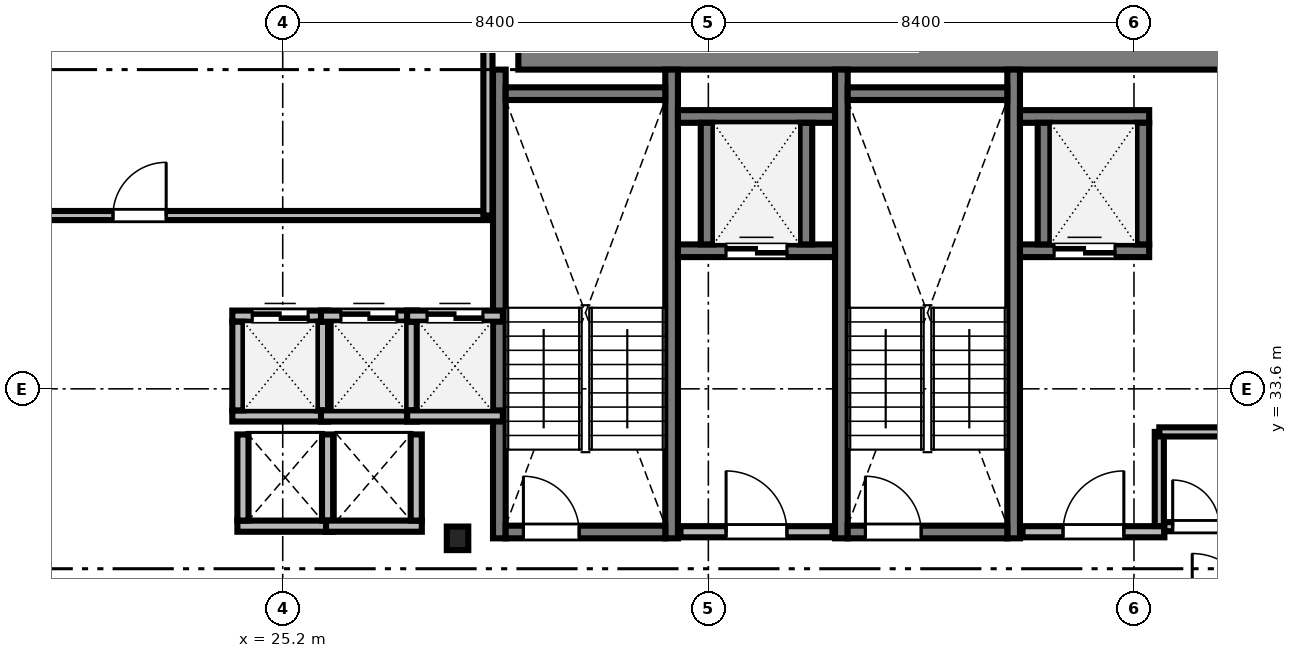
"""IFC4 building model, lengths in metres.
Left out: names, types, materials, properties, quantities, classifications, styles, units other than length and angle.
Written with IfcOpenShell. Run it as: python <this file> out.ifc"""

import sys

from ifc_helpers import new_model, si_unit, direction, frame, frame_2d, origin, origin_2d, place, context, subcontext, project, spatial, rectangle, i_section, extrude, source, transform, mapped, element, fill, save


model = new_model("IFC4")
c1 = context("Model", 3, precision=1e-05, world=origin(), true_north=direction((0.0, 1.0)))
c2 = subcontext(c1, "Body", "Model", "MODEL_VIEW")
j1 = project(units=[si_unit("LENGTHUNIT", "METRE"), si_unit("PLANEANGLEUNIT", "RADIAN")], contexts=[c1])
p1 = place(None, origin())
s1 = spatial("IfcSite", under=j1, at=p1, CompositionType="ELEMENT")
p2 = place(p1, origin())
s2 = spatial("IfcBuilding", under=s1, at=p2, CompositionType="ELEMENT")
p3 = place(p2, frame((0.0, 0.0, 115.0)))
s3 = spatial("IfcBuildingStorey", under=s2, at=p3, CompositionType="ELEMENT", Elevation=115.0)
m1 = source(origin(), c2, "Body", "SweptSolid", [
    extrude(rectangle(XDim=17.52, YDim=0.8, at=frame_2d((8.76, 0.0))), origin(), (0.0, 0.0, 1.0), 3.46),
])
p4 = place(p3, frame((29.85, 40.3, 0.0), z_axis=(0.0, 0.0, 1.0), x_axis=(1.0, 0.0, 0.0)))
e1 = element("IfcWall", 1, at=p4, inside=s3, PredefinedType="SHEAR", context=c2, shape_type="MappedRepresentation", body=[
    mapped(m1, transform((0.0, 0.0, 0.0), scale=1.0)),
])
m2 = source(origin(), c2, "Body", "SweptSolid", [
    extrude(i_section(OverallWidth=0.424, OverallDepth=0.465, WebThickness=0.035, FlangeThickness=0.056, FilletRadius=0.015, at=origin_2d()), origin(), (0.0, 0.0, 1.0), 3.46),
])
p5 = place(p3, frame((28.65, 30.65, 0.0), z_axis=(0.0, 0.0, 1.0), x_axis=(1.0, 0.0, 0.0)))
e2 = element("IfcColumn", 2, at=p5, inside=s3, PredefinedType="COLUMN", context=c2, shape_type="MappedRepresentation", body=[
    mapped(m2, transform((0.0, 0.0, 0.0), scale=1.0)),
])
m3 = source(origin(), c2, "Body", "SweptSolid", [
    extrude(rectangle(XDim=9.25, YDim=0.25, at=frame_2d((4.625, 0.0))), origin(), (0.0, 0.0, 1.0), 3.5),
])
for number, where, z_axis, x_axis in (
    (3, (29.475, 30.65, 0.0), (0.0, 0.0, 1.0), (0.0, 1.0, 0.0)),
    (4, (32.875, 30.65, 0.0), (0.0, 0.0, 1.0), (0.0, 1.0, 0.0)),
):
    element("IfcWall", number, at=place(p3, frame(where, z_axis=z_axis, x_axis=x_axis)), inside=s3, PredefinedType="SOLIDWALL", context=c2, shape_type="MappedRepresentation", body=[
        mapped(m3, transform((0.0, 0.0, 0.0), scale=1.0)),
    ])
m4 = source(origin(), c2, "Body", "SweptSolid", [
    extrude(rectangle(XDim=3.15, YDim=0.25, at=frame_2d((1.575, 0.0))), origin(), (0.0, 0.0, 1.0), 3.5),
])
p6 = place(p3, frame((29.6, 39.425, 0.0), z_axis=(0.0, 0.0, 1.0), x_axis=(1.0, 0.0, 0.0)))
e5 = element("IfcWall", 5, at=p6, inside=s3, PredefinedType="SOLIDWALL", context=c2, shape_type="MappedRepresentation", body=[
    mapped(m4, transform((0.0, 0.0, 0.0), scale=1.0)),
])
p7 = place(p3, frame((29.6, 30.775, 0.0), z_axis=(0.0, 0.0, 1.0), x_axis=(1.0, 0.0, 0.0)))
e6 = element("IfcWall", 6, at=p7, inside=s3, PredefinedType="SOLIDWALL", context=c2, shape_type="MappedRepresentation", body=[
    mapped(m4, transform((0.0, 0.0, 0.0), scale=1.0)),
])
m5 = source(origin(), c2, "Body", "SweptSolid", [
    extrude(rectangle(XDim=1.1, YDim=2.2, at=frame_2d((0.55, 1.1))), frame((0.0, 0.135, 0.0), z_axis=(0.0, -1.0, 0.0), x_axis=(1.0, 0.0, 0.0)), (0.0, 0.0, 1.0), 0.27),
])
p8 = place(p7, frame((0.35, 0.0, 0.0)))
e7 = element("IfcOpeningElement", 7, at=p8, cuts=e6, PredefinedType="OPENING", context=c2, shape_type="MappedRepresentation", body=[
    mapped(m5, transform((0.0, 0.0, 0.0), scale=1.0)),
])
for number, where, z_axis, x_axis in (
    (8, (36.225, 30.65, 0.0), (0.0, 0.0, 1.0), (0.0, 1.0, 0.0)),
    (9, (39.625, 30.65, 0.0), (0.0, 0.0, 1.0), (0.0, 1.0, 0.0)),
):
    element("IfcWall", number, at=place(p3, frame(where, z_axis=z_axis, x_axis=x_axis)), inside=s3, PredefinedType="SOLIDWALL", context=c2, shape_type="MappedRepresentation", body=[
        mapped(m3, transform((0.0, 0.0, 0.0), scale=1.0)),
    ])
p9 = place(p3, frame((36.35, 39.425, 0.0), z_axis=(0.0, 0.0, 1.0), x_axis=(1.0, 0.0, 0.0)))
e10 = element("IfcWall", 10, at=p9, inside=s3, PredefinedType="SOLIDWALL", context=c2, shape_type="MappedRepresentation", body=[
    mapped(m4, transform((0.0, 0.0, 0.0), scale=1.0)),
])
p10 = place(p3, frame((36.35, 30.775, 0.0), z_axis=(0.0, 0.0, 1.0), x_axis=(1.0, 0.0, 0.0)))
e11 = element("IfcWall", 11, at=p10, inside=s3, PredefinedType="SOLIDWALL", context=c2, shape_type="MappedRepresentation", body=[
    mapped(m4, transform((0.0, 0.0, 0.0), scale=1.0)),
])
p11 = place(p10, frame((0.35, 0.0, 0.0)))
e12 = element("IfcOpeningElement", 12, at=p11, cuts=e11, PredefinedType="OPENING", context=c2, shape_type="MappedRepresentation", body=[
    mapped(m5, transform((0.0, 0.0, 0.0), scale=1.0)),
])
m6 = source(origin(), c2, "Body", "SweptSolid", [
    extrude(rectangle(XDim=3.0, YDim=0.22, at=frame_2d((1.5, 0.0))), origin(), (0.0, 0.0, 1.0), 3.46),
])
p12 = place(p3, frame((33.05, 30.78, 0.0), z_axis=(0.0, 0.0, 1.0), x_axis=(1.0, 0.0, 0.0)))
e13 = element("IfcWall", 13, at=p12, inside=s3, PredefinedType="SOLIDWALL", context=c2, shape_type="MappedRepresentation", body=[
    mapped(m6, transform((0.0, 0.0, 0.0), scale=1.0)),
])
m7 = source(origin(), c2, "Body", "SweptSolid", [
    extrude(rectangle(XDim=1.2, YDim=2.2, at=frame_2d((0.6, 1.1))), frame((0.0, 0.12, 0.0), z_axis=(0.0, -1.0, 0.0), x_axis=(1.0, 0.0, 0.0)), (0.0, 0.0, 1.0), 0.24),
])
p13 = place(p12, frame((0.9, 0.0, 0.0)))
e14 = element("IfcOpeningElement", 14, at=p13, cuts=e13, PredefinedType="OPENING", context=c2, shape_type="MappedRepresentation", body=[
    mapped(m7, transform((0.0, 0.0, 0.0), scale=1.0)),
])
m8 = source(origin(), c2, "Body", "SweptSolid", [
    extrude(rectangle(XDim=2.8, YDim=0.22, at=frame_2d((1.4, 0.0))), origin(), (0.0, 0.0, 1.0), 3.46),
])
p14 = place(p3, frame((39.8, 30.78, 0.0), z_axis=(0.0, 0.0, 1.0), x_axis=(1.0, 0.0, 0.0)))
e15 = element("IfcWall", 15, at=p14, inside=s3, PredefinedType="SOLIDWALL", context=c2, shape_type="MappedRepresentation", body=[
    mapped(m8, transform((0.0, 0.0, 0.0), scale=1.0)),
])
p15 = place(p14, frame((0.8, 0.0, 0.0)))
e16 = element("IfcOpeningElement", 16, at=p15, cuts=e15, PredefinedType="OPENING", context=c2, shape_type="MappedRepresentation", body=[
    mapped(m7, transform((0.0, 0.0, 0.0), scale=1.0)),
])
m9 = source(origin(), c2, "Body", "SweptSolid", [
    extrude(rectangle(XDim=1.89, YDim=0.22, at=frame_2d((0.945, 0.0))), origin(), (0.0, 0.0, 1.0), 3.46),
])
p16 = place(p3, frame((24.205, 33.065, 0.0), z_axis=(0.0, 0.0, 1.0), x_axis=(1.0, 0.0, 0.0)))
e17 = element("IfcWall", 17, at=p16, inside=s3, PredefinedType="SOLIDWALL", context=c2, shape_type="MappedRepresentation", body=[
    mapped(m9, transform((0.0, 0.0, 0.0), scale=1.0)),
])
p17 = place(p3, frame((24.205, 35.035, 0.0), z_axis=(0.0, 0.0, 1.0), x_axis=(1.0, 0.0, 0.0)))
e18 = element("IfcWall", 18, at=p17, inside=s3, PredefinedType="SOLIDWALL", context=c2, shape_type="MappedRepresentation", body=[
    mapped(m9, transform((0.0, 0.0, 0.0), scale=1.0)),
])
m10 = source(origin(), c2, "Body", "SweptSolid", [
    extrude(rectangle(XDim=1.1, YDim=2.2, at=frame_2d((0.55, 1.1))), frame((0.0, 0.12, 0.0), z_axis=(0.0, -1.0, 0.0), x_axis=(1.0, 0.0, 0.0)), (0.0, 0.0, 1.0), 0.24),
])
p18 = place(p17, frame((0.395, 0.0, 0.0)))
e19 = element("IfcOpeningElement", 19, at=p18, cuts=e18, PredefinedType="OPENING", context=c2, shape_type="MappedRepresentation", body=[
    mapped(m10, transform((0.0, 0.0, 0.0), scale=1.0)),
])
m11 = source(origin(), c2, "Body", "SweptSolid", [
    extrude(rectangle(XDim=1.75, YDim=0.22, at=frame_2d((0.875, 0.0))), origin(), (0.0, 0.0, 1.0), 3.46),
])
for number, where, z_axis, x_axis in (
    (20, (24.315, 33.175, 0.0), (0.0, 0.0, 1.0), (0.0, 1.0, 0.0)),
    (21, (25.985, 33.175, 0.0), (0.0, 0.0, 1.0), (0.0, 1.0, 0.0)),
):
    element("IfcWall", number, at=place(p3, frame(where, z_axis=z_axis, x_axis=x_axis)), inside=s3, PredefinedType="SOLIDWALL", context=c2, shape_type="MappedRepresentation", body=[
        mapped(m11, transform((0.0, 0.0, 0.0), scale=1.0)),
    ])
p19 = place(p3, frame((25.955, 33.065, 0.0), z_axis=(0.0, 0.0, 1.0), x_axis=(1.0, 0.0, 0.0)))
e22 = element("IfcWall", 22, at=p19, inside=s3, PredefinedType="SOLIDWALL", context=c2, shape_type="MappedRepresentation", body=[
    mapped(m9, transform((0.0, 0.0, 0.0), scale=1.0)),
])
p20 = place(p3, frame((25.955, 35.035, 0.0), z_axis=(0.0, 0.0, 1.0), x_axis=(1.0, 0.0, 0.0)))
e23 = element("IfcWall", 23, at=p20, inside=s3, PredefinedType="SOLIDWALL", context=c2, shape_type="MappedRepresentation", body=[
    mapped(m9, transform((0.0, 0.0, 0.0), scale=1.0)),
])
p21 = place(p20, frame((0.395, 0.0, 0.0)))
e24 = element("IfcOpeningElement", 24, at=p21, cuts=e23, PredefinedType="OPENING", context=c2, shape_type="MappedRepresentation", body=[
    mapped(m10, transform((0.0, 0.0, 0.0), scale=1.0)),
])
p22 = place(p3, frame((27.735, 33.175, 0.0), z_axis=(0.0, 0.0, 1.0), x_axis=(0.0, 1.0, 0.0)))
e25 = element("IfcWall", 25, at=p22, inside=s3, PredefinedType="SOLIDWALL", context=c2, shape_type="MappedRepresentation", body=[
    mapped(m11, transform((0.0, 0.0, 0.0), scale=1.0)),
])
p23 = place(p3, frame((27.655, 33.065, 0.0), z_axis=(0.0, 0.0, 1.0), x_axis=(1.0, 0.0, 0.0)))
e26 = element("IfcWall", 26, at=p23, inside=s3, PredefinedType="SOLIDWALL", context=c2, shape_type="MappedRepresentation", body=[
    mapped(m9, transform((0.0, 0.0, 0.0), scale=1.0)),
])
p24 = place(p3, frame((27.655, 35.035, 0.0), z_axis=(0.0, 0.0, 1.0), x_axis=(1.0, 0.0, 0.0)))
e27 = element("IfcWall", 27, at=p24, inside=s3, PredefinedType="SOLIDWALL", context=c2, shape_type="MappedRepresentation", body=[
    mapped(m9, transform((0.0, 0.0, 0.0), scale=1.0)),
])
p25 = place(p24, frame((0.395, 0.0, 0.0)))
e28 = element("IfcOpeningElement", 28, at=p25, cuts=e27, PredefinedType="OPENING", context=c2, shape_type="MappedRepresentation", body=[
    mapped(m10, transform((0.0, 0.0, 0.0), scale=1.0)),
])
m12 = source(origin(), c2, "Body", "SweptSolid", [
    extrude(rectangle(XDim=3.1, YDim=0.25, at=frame_2d((1.55, 0.0))), origin(), (0.0, 0.0, 1.0), 3.46),
])
p26 = place(p3, frame((33.0, 36.325, 0.0), z_axis=(0.0, 0.0, 1.0), x_axis=(1.0, 0.0, 0.0)))
e29 = element("IfcWall", 29, at=p26, inside=s3, PredefinedType="SOLIDWALL", context=c2, shape_type="MappedRepresentation", body=[
    mapped(m12, transform((0.0, 0.0, 0.0), scale=1.0)),
])
m13 = source(origin(), c2, "Body", "SweptSolid", [
    extrude(rectangle(XDim=1.2, YDim=2.25, at=frame_2d((0.6, 1.125))), frame((0.0, 0.135, 0.0), z_axis=(0.0, -1.0, 0.0), x_axis=(1.0, 0.0, 0.0)), (0.0, 0.0, 1.0), 0.27),
])
p27 = place(p26, frame((0.95, 0.0, 0.0)))
e30 = element("IfcOpeningElement", 30, at=p27, cuts=e29, PredefinedType="OPENING", context=c2, shape_type="MappedRepresentation", body=[
    mapped(m13, transform((0.0, 0.0, 0.0), scale=1.0)),
])
p28 = place(p3, frame((33.0, 38.975, 0.0), z_axis=(0.0, 0.0, 1.0), x_axis=(1.0, 0.0, 0.0)))
e31 = element("IfcWall", 31, at=p28, inside=s3, PredefinedType="SOLIDWALL", context=c2, shape_type="MappedRepresentation", body=[
    mapped(m12, transform((0.0, 0.0, 0.0), scale=1.0)),
])
m14 = source(origin(), c2, "Body", "SweptSolid", [
    extrude(rectangle(XDim=2.4, YDim=0.25, at=frame_2d((1.2, 0.0))), origin(), (0.0, 0.0, 1.0), 3.46),
])
for number, where, z_axis, x_axis in (
    (32, (33.575, 36.45, 0.0), (0.0, 0.0, 1.0), (0.0, 1.0, 0.0)),
    (33, (35.525, 36.45, 0.0), (0.0, 0.0, 1.0), (0.0, 1.0, 0.0)),
):
    element("IfcWall", number, at=place(p3, frame(where, z_axis=z_axis, x_axis=x_axis)), inside=s3, PredefinedType="SOLIDWALL", context=c2, shape_type="MappedRepresentation", body=[
        mapped(m14, transform((0.0, 0.0, 0.0), scale=1.0)),
    ])
m15 = source(origin(), c2, "Body", "SweptSolid", [
    extrude(rectangle(XDim=2.55, YDim=0.25, at=frame_2d((1.275, 0.0))), origin(), (0.0, 0.0, 1.0), 3.46),
])
p29 = place(p3, frame((39.75, 36.325, 0.0), z_axis=(0.0, 0.0, 1.0), x_axis=(1.0, 0.0, 0.0)))
e34 = element("IfcWall", 34, at=p29, inside=s3, PredefinedType="SOLIDWALL", context=c2, shape_type="MappedRepresentation", body=[
    mapped(m15, transform((0.0, 0.0, 0.0), scale=1.0)),
])
p30 = place(p29, frame((0.675, 0.0, 0.0)))
e35 = element("IfcOpeningElement", 35, at=p30, cuts=e34, PredefinedType="OPENING", context=c2, shape_type="MappedRepresentation", body=[
    mapped(m13, transform((0.0, 0.0, 0.0), scale=1.0)),
])
p31 = place(p3, frame((39.75, 38.975, 0.0), z_axis=(0.0, 0.0, 1.0), x_axis=(1.0, 0.0, 0.0)))
e36 = element("IfcWall", 36, at=p31, inside=s3, PredefinedType="SOLIDWALL", context=c2, shape_type="MappedRepresentation", body=[
    mapped(m15, transform((0.0, 0.0, 0.0), scale=1.0)),
])
for number, where, z_axis, x_axis in (
    (37, (40.225, 36.45, 0.0), (0.0, 0.0, 1.0), (0.0, 1.0, 0.0)),
    (38, (42.175, 36.45, 0.0), (0.0, 0.0, 1.0), (0.0, 1.0, 0.0)),
):
    element("IfcWall", number, at=place(p3, frame(where, z_axis=z_axis, x_axis=x_axis)), inside=s3, PredefinedType="SOLIDWALL", context=c2, shape_type="MappedRepresentation", body=[
        mapped(m14, transform((0.0, 0.0, 0.0), scale=1.0)),
    ])
m16 = source(origin(), c2, "Body", "SweptSolid", [
    extrude(rectangle(XDim=1.89, YDim=0.22, at=frame_2d((0.945, 0.0))), origin(), (0.0, 0.0, 1.0), 3.46),
])
p32 = place(p3, frame((24.305, 30.89, 0.0), z_axis=(0.0, 0.0, 1.0), x_axis=(1.0, 0.0, 0.0)))
e39 = element("IfcWall", 39, at=p32, inside=s3, PredefinedType="SOLIDWALL", context=c2, shape_type="MappedRepresentation", body=[
    mapped(m16, transform((0.0, 0.0, 0.0), scale=1.0)),
])
m17 = source(origin(), c2, "Body", "SweptSolid", [
    extrude(rectangle(XDim=1.7, YDim=0.22, at=frame_2d((0.85, 0.0))), origin(), (0.0, 0.0, 1.0), 3.46),
])
for number, where, z_axis, x_axis in (
    (40, (24.415, 31.0, 0.0), (0.0, 0.0, 1.0), (0.0, 1.0, 0.0)),
    (41, (26.085, 31.0, 0.0), (0.0, 0.0, 1.0), (0.0, 1.0, 0.0)),
):
    element("IfcWall", number, at=place(p3, frame(where, z_axis=z_axis, x_axis=x_axis)), inside=s3, PredefinedType="SOLIDWALL", context=c2, shape_type="MappedRepresentation", body=[
        mapped(m17, transform((0.0, 0.0, 0.0), scale=1.0)),
    ])
p33 = place(p3, frame((26.055, 30.89, 0.0), z_axis=(0.0, 0.0, 1.0), x_axis=(1.0, 0.0, 0.0)))
e42 = element("IfcWall", 42, at=p33, inside=s3, PredefinedType="SOLIDWALL", context=c2, shape_type="MappedRepresentation", body=[
    mapped(m16, transform((0.0, 0.0, 0.0), scale=1.0)),
])
p34 = place(p3, frame((27.835, 31.0, 0.0), z_axis=(0.0, 0.0, 1.0), x_axis=(0.0, 1.0, 0.0)))
e43 = element("IfcWall", 43, at=p34, inside=s3, PredefinedType="SOLIDWALL", context=c2, shape_type="MappedRepresentation", body=[
    mapped(m17, transform((0.0, 0.0, 0.0), scale=1.0)),
])
m18 = source(origin(), c2, "Body", "SweptSolid", [
    extrude(rectangle(XDim=22.328, YDim=0.18, at=frame_2d((11.164, 0.0))), origin(), (0.0, 0.0, 1.0), 2.702),
])
p35 = place(p3, frame((6.922, 37.02, 0.0), z_axis=(0.0, 0.0, 1.0), x_axis=(1.0, 0.0, 0.0)))
e44 = element("IfcWall", 44, at=p35, inside=s3, PredefinedType="PARTITIONING", context=c2, shape_type="MappedRepresentation", body=[
    mapped(m18, transform((0.0, 0.0, 0.0), scale=1.0)),
])
m19 = source(origin(), c2, "Body", "SweptSolid", [
    extrude(rectangle(XDim=1.05, YDim=2.2, at=frame_2d((0.525, 1.1))), frame((0.0, 0.1, 0.0), z_axis=(0.0, -1.0, 0.0), x_axis=(1.0, 0.0, 0.0)), (0.0, 0.0, 1.0), 0.2),
])
p36 = place(p35, frame((14.928, 0.0, 0.0)))
e45 = element("IfcOpeningElement", 45, at=p36, cuts=e44, PredefinedType="OPENING", context=c2, shape_type="MappedRepresentation", body=[
    mapped(m19, transform((0.0, 0.0, 0.0), scale=1.0)),
])
m20 = source(origin(), c2, "Body", "SweptSolid", [
    extrude(rectangle(XDim=1.248, YDim=0.18, at=frame_2d((0.624, 0.0))), origin(), (0.0, 0.0, 1.0), 3.46),
])
p37 = place(p3, frame((42.6, 30.88, 0.0), z_axis=(0.0, 0.0, 1.0), x_axis=(1.0, 0.0, 0.0)))
e46 = element("IfcWall", 46, at=p37, inside=s3, PredefinedType="PARTITIONING", context=c2, shape_type="MappedRepresentation", body=[
    mapped(m20, transform((0.0, 0.0, 0.0), scale=1.0)),
])
m21 = source(origin(), c2, "Body", "SweptSolid", [
    extrude(rectangle(XDim=0.92, YDim=2.1, at=frame_2d((0.46, 1.05))), frame((0.0, 0.1, 0.0), z_axis=(0.0, -1.0, 0.0), x_axis=(1.0, 0.0, 0.0)), (0.0, 0.0, 1.0), 0.2),
])
p38 = place(p37, frame((0.164, 0.0, 0.0)))
e47 = element("IfcOpeningElement", 47, at=p38, cuts=e46, PredefinedType="OPENING", context=c2, shape_type="MappedRepresentation", body=[
    mapped(m21, transform((0.0, 0.0, 0.0), scale=1.0)),
])
m22 = source(origin(), c2, "Body", "SweptSolid", [
    extrude(rectangle(XDim=11.45, YDim=0.18, at=frame_2d((5.725, 0.0))), origin(), (0.0, 0.0, 1.0), 2.702),
])
p39 = place(p3, frame((29.25, 37.02, 0.0), z_axis=(0.0, 0.0, 1.0), x_axis=(0.0, 1.0, 0.0)))
e48 = element("IfcWall", 48, at=p39, inside=s3, PredefinedType="PARTITIONING", context=c2, shape_type="MappedRepresentation", body=[
    mapped(m22, transform((0.0, 0.0, 0.0), scale=1.0)),
])
m23 = source(origin(), c2, "Body", "SweptSolid", [
    extrude(rectangle(XDim=1.858, YDim=0.18, at=frame_2d((0.929, 0.0))), origin(), (0.0, 0.0, 1.0), 3.46),
])
p40 = place(p3, frame((42.5, 30.892, 0.0), z_axis=(0.0, 0.0, 1.0), x_axis=(0.0, 1.0, 0.0)))
e49 = element("IfcWall", 49, at=p40, inside=s3, PredefinedType="PARTITIONING", context=c2, shape_type="MappedRepresentation", body=[
    mapped(m23, transform((0.0, 0.0, 0.0), scale=1.0)),
])
m24 = source(origin(), c2, "Body", "SweptSolid", [
    extrude(rectangle(XDim=1.348, YDim=0.18, at=frame_2d((0.674, 0.0))), origin(), (0.0, 0.0, 1.0), 3.46),
])
p41 = place(p3, frame((42.5, 32.75, 0.0), z_axis=(0.0, 0.0, 1.0), x_axis=(1.0, 0.0, 0.0)))
e50 = element("IfcWall", 50, at=p41, inside=s3, PredefinedType="PARTITIONING", context=c2, shape_type="MappedRepresentation", body=[
    mapped(m24, transform((0.0, 0.0, 0.0), scale=1.0)),
])
m25 = source(origin(), c2, "Body", "SweptSolid", [
    extrude(rectangle(XDim=1.1, YDim=2.2, at=frame_2d((0.55, 1.1))), frame((0.0, 0.025, 0.0), z_axis=(0.0, -1.0, 0.0), x_axis=(1.0, 0.0, 0.0)), (0.0, 0.0, 1.0), 0.05),
])
p42 = place(p8, origin())
e51 = element("IfcDoor", 51, at=p42, inside=s3, OperationType="SINGLE_SWING_LEFT", PredefinedType="DOOR", context=c2, shape_type="MappedRepresentation", body=[
    mapped(m25, transform((0.0, 0.0, 0.0), scale=1.0)),
])
fill(e7, e51)
p43 = place(p11, origin())
e52 = element("IfcDoor", 52, at=p43, inside=s3, OperationType="SINGLE_SWING_LEFT", PredefinedType="DOOR", context=c2, shape_type="MappedRepresentation", body=[
    mapped(m25, transform((0.0, 0.0, 0.0), scale=1.0)),
])
fill(e12, e52)
m26 = source(origin(), c2, "Body", "SweptSolid", [
    extrude(rectangle(XDim=1.2, YDim=2.2, at=frame_2d((0.6, 1.1))), frame((0.0, 0.025, 0.0), z_axis=(0.0, -1.0, 0.0), x_axis=(1.0, 0.0, 0.0)), (0.0, 0.0, 1.0), 0.05),
])
p44 = place(p13, origin())
e53 = element("IfcDoor", 53, at=p44, inside=s3, OperationType="SINGLE_SWING_LEFT", PredefinedType="DOOR", context=c2, shape_type="MappedRepresentation", body=[
    mapped(m26, transform((0.0, 0.0, 0.0), scale=1.0)),
])
fill(e14, e53)
p45 = place(p15, origin())
e54 = element("IfcDoor", 54, at=p45, inside=s3, OperationType="SINGLE_SWING_RIGHT", PredefinedType="DOOR", context=c2, shape_type="MappedRepresentation", body=[
    mapped(m26, transform((0.0, 0.0, 0.0), scale=1.0)),
])
fill(e16, e54)
p46 = place(p18, origin())
e55 = element("IfcDoor", 55, at=p46, inside=s3, OperationType="DOUBLE_DOOR_SLIDING", PredefinedType="DOOR", context=c2, shape_type="MappedRepresentation", body=[
    mapped(m25, transform((0.0, 0.0, 0.0), scale=1.0)),
])
fill(e19, e55)
p47 = place(p21, origin())
e56 = element("IfcDoor", 56, at=p47, inside=s3, OperationType="DOUBLE_DOOR_SLIDING", PredefinedType="DOOR", context=c2, shape_type="MappedRepresentation", body=[
    mapped(m25, transform((0.0, 0.0, 0.0), scale=1.0)),
])
fill(e24, e56)
p48 = place(p25, origin())
e57 = element("IfcDoor", 57, at=p48, inside=s3, OperationType="DOUBLE_DOOR_SLIDING", PredefinedType="DOOR", context=c2, shape_type="MappedRepresentation", body=[
    mapped(m25, transform((0.0, 0.0, 0.0), scale=1.0)),
])
fill(e28, e57)
m27 = source(origin(), c2, "Body", "SweptSolid", [
    extrude(rectangle(XDim=1.2, YDim=2.25, at=frame_2d((0.6, 1.125))), frame((0.0, 0.025, 0.0), z_axis=(0.0, -1.0, 0.0), x_axis=(1.0, 0.0, 0.0)), (0.0, 0.0, 1.0), 0.05),
])
p49 = place(p27, origin())
e58 = element("IfcDoor", 58, at=p49, inside=s3, OperationType="DOUBLE_DOOR_SLIDING", PredefinedType="DOOR", context=c2, shape_type="MappedRepresentation", body=[
    mapped(m27, transform((0.0, 0.0, 0.0), scale=1.0)),
])
fill(e30, e58)
p50 = place(p30, origin())
e59 = element("IfcDoor", 59, at=p50, inside=s3, OperationType="DOUBLE_DOOR_SLIDING", PredefinedType="DOOR", context=c2, shape_type="MappedRepresentation", body=[
    mapped(m27, transform((0.0, 0.0, 0.0), scale=1.0)),
])
fill(e35, e59)
m28 = source(origin(), c2, "Body", "SweptSolid", [
    extrude(rectangle(XDim=1.05, YDim=2.2, at=frame_2d((0.525, 1.1))), frame((0.0, 0.025, 0.0), z_axis=(0.0, -1.0, 0.0), x_axis=(1.0, 0.0, 0.0)), (0.0, 0.0, 1.0), 0.05),
])
p51 = place(p36, origin())
e60 = element("IfcDoor", 60, at=p51, inside=s3, OperationType="SINGLE_SWING_RIGHT", PredefinedType="DOOR", context=c2, shape_type="MappedRepresentation", body=[
    mapped(m28, transform((0.0, 0.0, 0.0), scale=1.0)),
])
fill(e45, e60)
m29 = source(origin(), c2, "Body", "SweptSolid", [
    extrude(rectangle(XDim=0.92, YDim=2.1, at=frame_2d((0.46, 1.05))), frame((0.0, 0.025, 0.0), z_axis=(0.0, -1.0, 0.0), x_axis=(1.0, 0.0, 0.0)), (0.0, 0.0, 1.0), 0.05),
])
p52 = place(p38, origin())
e61 = element("IfcDoor", 61, at=p52, inside=s3, OperationType="SINGLE_SWING_LEFT", PredefinedType="DOOR", context=c2, shape_type="MappedRepresentation", body=[
    mapped(m29, transform((0.0, 0.0, 0.0), scale=1.0)),
])
fill(e47, e61)
save(model, sys.argv[1])
